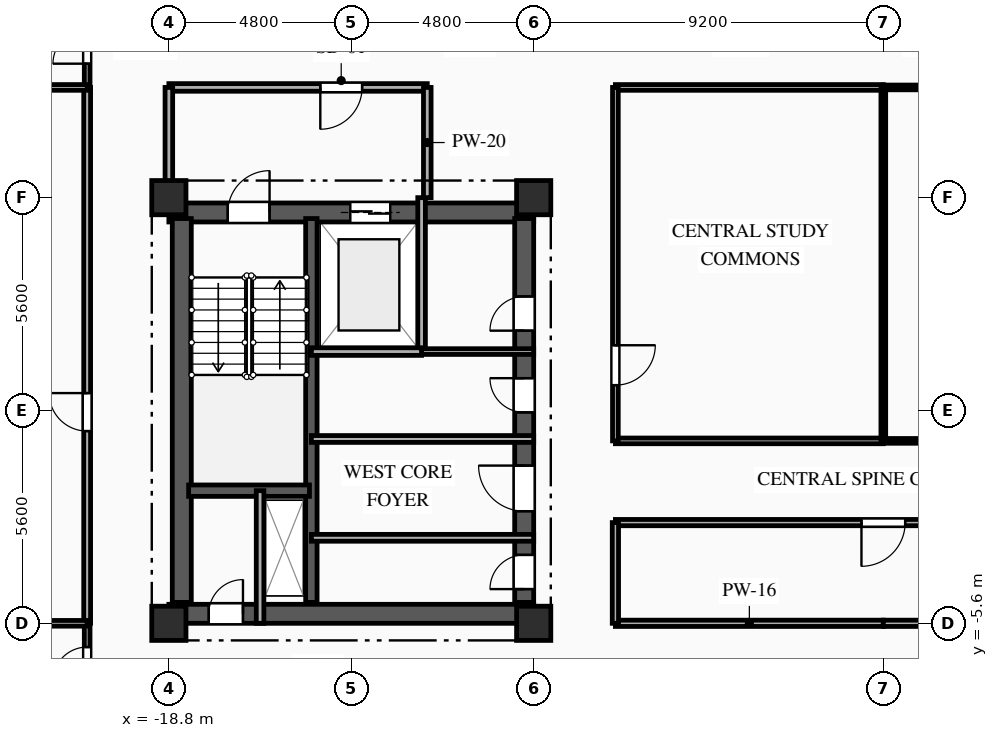
"""IFC4 building model, lengths in metres.
Left out: names, types, materials, properties, quantities, classifications, styles, units other than length and angle.
Written with IfcOpenShell. Run it as: python <this file> out.ifc"""

import sys

from ifc_helpers import new_model, si_unit, direction, frame, frame_2d, origin, origin_2d, place, context, subcontext, project, spatial, rectangle, extrude, element, fill, save


model = new_model("IFC4")
c1 = context("Model", 3, precision=1e-05, world=origin(), true_north=direction((0.0, 1.0)))
c2 = subcontext(c1, "Body", "Model", "MODEL_VIEW")
j1 = project(units=[si_unit("LENGTHUNIT", "METRE"), si_unit("PLANEANGLEUNIT", "RADIAN")], contexts=[c1])
p1 = place(None, origin())
s1 = spatial("IfcSite", under=j1, at=p1, CompositionType="ELEMENT")
p2 = place(p1, origin())
s2 = spatial("IfcBuilding", under=s1, at=p2, CompositionType="ELEMENT")
p3 = place(p2, frame((0.0, 0.0, 141.05)))
s3 = spatial("IfcBuildingStorey", under=s2, at=p3, CompositionType="ELEMENT", Elevation=141.05)
for number, where, z_axis, x_axis in (
    (1, (-18.8, -5.6, 0.0), (0.0, 0.0, 1.0), (1.0, 0.0, 0.0)),
    (2, (-18.8, 5.6, 0.0), (0.0, 0.0, 1.0), (1.0, 0.0, 0.0)),
    (3, (-9.2, -5.6, 0.0), (0.0, 0.0, 1.0), (1.0, 0.0, 0.0)),
    (4, (-9.2, 5.6, 0.0), (0.0, 0.0, 1.0), (1.0, 0.0, 0.0)),
):
    element("IfcColumn", number, at=place(p3, frame(where, z_axis=z_axis, x_axis=x_axis)), inside=s3, PredefinedType="COLUMN", context=c2, shape_type="SweptSolid", body=[
        extrude(rectangle(XDim=0.9, YDim=0.9, at=origin_2d()), origin(), (0.0, 0.0, 1.0), 3.35),
    ])
p4 = place(p3, frame((-18.8, 5.21, 0.0), z_axis=(0.0, 0.0, 1.0), x_axis=(1.0, 0.0, 0.0)))
e5 = element("IfcWall", 5, at=p4, inside=s3, PredefinedType="SHEAR", context=c2, shape_type="SweptSolid", body=[
    extrude(rectangle(XDim=9.6, YDim=0.5, at=frame_2d((4.8, 0.0))), origin(), (0.0, 0.0, 1.0), 3.04),
])
p5 = place(p4, frame((1.55, 0.0, 0.0)))
e6 = element("IfcOpeningElement", 6, at=p5, cuts=e5, PredefinedType="OPENING", context=c2, shape_type="SweptSolid", body=[
    extrude(rectangle(XDim=1.1, YDim=2.15, at=frame_2d((0.55, 1.075))), frame((0.0, 0.26, 0.0), z_axis=(0.0, -1.0, 0.0), x_axis=(1.0, 0.0, 0.0)), (0.0, 0.0, 1.0), 0.52),
])
p6 = place(p4, frame((4.775, 0.0, 0.0)))
e7 = element("IfcOpeningElement", 7, at=p6, cuts=e5, PredefinedType="OPENING", context=c2, shape_type="SweptSolid", body=[
    extrude(rectangle(XDim=1.05, YDim=2.1, at=frame_2d((0.525, 1.05))), frame((0.0, 0.26, 0.0), z_axis=(0.0, -1.0, 0.0), x_axis=(1.0, 0.0, 0.0)), (0.0, 0.0, 1.0), 0.52),
])
p7 = place(p3, frame((-18.8, -5.35, 0.0), z_axis=(0.0, 0.0, 1.0), x_axis=(1.0, 0.0, 0.0)))
e8 = element("IfcWall", 8, at=p7, inside=s3, PredefinedType="SHEAR", context=c2, shape_type="SweptSolid", body=[
    extrude(rectangle(XDim=9.6, YDim=0.5, at=frame_2d((4.8, 0.0))), origin(), (0.0, 0.0, 1.0), 3.04),
])
p8 = place(p7, frame((1.05, 0.0, 0.0)))
e9 = element("IfcOpeningElement", 9, at=p8, cuts=e8, PredefinedType="OPENING", context=c2, shape_type="SweptSolid", body=[
    extrude(rectangle(XDim=0.9, YDim=2.1, at=frame_2d((0.45, 1.05))), frame((0.0, 0.26, 0.0), z_axis=(0.0, -1.0, 0.0), x_axis=(1.0, 0.0, 0.0)), (0.0, 0.0, 1.0), 0.52),
])
p9 = place(p3, frame((-18.46, -5.05, 0.0), z_axis=(0.0, 0.0, 1.0), x_axis=(0.0, 1.0, 0.0)))
e10 = element("IfcWall", 10, at=p9, inside=s3, PredefinedType="SHEAR", context=c2, shape_type="SweptSolid", body=[
    extrude(rectangle(XDim=10.1, YDim=0.5, at=frame_2d((5.05, 0.0))), origin(), (0.0, 0.0, 1.0), 3.04),
])
p10 = place(p3, frame((-9.45, -5.05, 0.0), z_axis=(0.0, 0.0, 1.0), x_axis=(0.0, 1.0, 0.0)))
e11 = element("IfcWall", 11, at=p10, inside=s3, PredefinedType="SHEAR", context=c2, shape_type="SweptSolid", body=[
    extrude(rectangle(XDim=10.1, YDim=0.5, at=frame_2d((5.05, 0.0))), origin(), (0.0, 0.0, 1.0), 3.04),
])
p11 = place(p10, frame((7.15, 0.0, 0.0)))
e12 = element("IfcOpeningElement", 12, at=p11, cuts=e11, PredefinedType="OPENING", context=c2, shape_type="SweptSolid", body=[
    extrude(rectangle(XDim=0.9, YDim=2.1, at=frame_2d((0.45, 1.05))), frame((0.0, 0.26, 0.0), z_axis=(0.0, -1.0, 0.0), x_axis=(1.0, 0.0, 0.0)), (0.0, 0.0, 1.0), 0.52),
])
p12 = place(p10, frame((2.4, 0.0, 0.0)))
e13 = element("IfcOpeningElement", 13, at=p12, cuts=e11, PredefinedType="OPENING", context=c2, shape_type="SweptSolid", body=[
    extrude(rectangle(XDim=1.2, YDim=2.15, at=frame_2d((0.6, 1.075))), frame((0.0, 0.26, 0.0), z_axis=(0.0, -1.0, 0.0), x_axis=(1.0, 0.0, 0.0)), (0.0, 0.0, 1.0), 0.52),
])
p13 = place(p10, frame((0.35, 0.0, 0.0)))
e14 = element("IfcOpeningElement", 14, at=p13, cuts=e11, PredefinedType="OPENING", context=c2, shape_type="SweptSolid", body=[
    extrude(rectangle(XDim=0.9, YDim=2.1, at=frame_2d((0.45, 1.05))), frame((0.0, 0.26, 0.0), z_axis=(0.0, -1.0, 0.0), x_axis=(1.0, 0.0, 0.0)), (0.0, 0.0, 1.0), 0.52),
])
p14 = place(p10, frame((5.0, 0.0, 0.0)))
e15 = element("IfcOpeningElement", 15, at=p14, cuts=e11, PredefinedType="OPENING", context=c2, shape_type="SweptSolid", body=[
    extrude(rectangle(XDim=0.9, YDim=2.1, at=frame_2d((0.45, 1.05))), frame((0.0, 0.26, 0.0), z_axis=(0.0, -1.0, 0.0), x_axis=(1.0, 0.0, 0.0)), (0.0, 0.0, 1.0), 0.52),
])
p15 = place(p3, frame((-15.05, -5.05, 0.0), z_axis=(0.0, 0.0, 1.0), x_axis=(0.0, 1.0, 0.0)))
e16 = element("IfcWall", 16, at=p15, inside=s3, PredefinedType="SHEAR", context=c2, shape_type="SweptSolid", body=[
    extrude(rectangle(XDim=10.1, YDim=0.3, at=frame_2d((5.05, 0.0))), origin(), (0.0, 0.0, 1.0), 3.04),
])
p16 = place(p3, frame((-18.28, -2.11, 0.0), z_axis=(0.0, 0.0, 1.0), x_axis=(1.0, 0.0, 0.0)))
e17 = element("IfcWall", 17, at=p16, inside=s3, PredefinedType="SHEAR", context=c2, shape_type="SweptSolid", body=[
    extrude(rectangle(XDim=3.18, YDim=0.3, at=frame_2d((1.59, 0.0))), origin(), (0.0, 0.0, 1.0), 3.04),
])
p17 = place(p3, frame((-16.4, -5.6, 0.0), z_axis=(0.0, 0.0, 1.0), x_axis=(0.0, 1.0, 0.0)))
e18 = element("IfcWall", 18, at=p17, inside=s3, PredefinedType="PARTITIONING", context=c2, shape_type="SweptSolid", body=[
    extrude(rectangle(XDim=3.49, YDim=0.2, at=frame_2d((1.745, 0.0))), origin(), (0.0, 0.0, 1.0), 3.04),
])
p18 = place(p3, frame((-12.15, 1.55, 0.0), z_axis=(0.0, 0.0, 1.0), x_axis=(0.0, 1.0, 0.0)))
e19 = element("IfcWall", 19, at=p18, inside=s3, PredefinedType="PARTITIONING", context=c2, shape_type="SweptSolid", body=[
    extrude(rectangle(XDim=4.05, YDim=0.2, at=frame_2d((2.025, 0.0))), origin(), (0.0, 0.0, 1.0), 3.04),
])
p19 = place(p3, frame((-12.0, 8.5, 0.0), z_axis=(0.0, 0.0, 1.0), x_axis=(-1.0, 0.0, 0.0)))
e20 = element("IfcWall", 20, at=p19, inside=s3, PredefinedType="PARTITIONING", context=c2, shape_type="SweptSolid", body=[
    extrude(rectangle(XDim=6.8, YDim=0.2, at=frame_2d((3.4, 0.0))), origin(), (0.0, 0.0, 1.0), 3.04),
])
p20 = place(p19, frame((1.715, 0.0, 0.0)))
e21 = element("IfcOpeningElement", 21, at=p20, cuts=e20, PredefinedType="OPENING", context=c2, shape_type="SweptSolid", body=[
    extrude(rectangle(XDim=1.1, YDim=2.15, at=frame_2d((0.55, 1.075))), frame((0.0, 0.11, 0.0), z_axis=(0.0, -1.0, 0.0), x_axis=(1.0, 0.0, 0.0)), (0.0, 0.0, 1.0), 0.22),
])
p21 = place(p3, frame((-18.8, 8.5, 0.0), z_axis=(0.0, 0.0, 1.0), x_axis=(0.0, -1.0, 0.0)))
e22 = element("IfcWall", 22, at=p21, inside=s3, PredefinedType="PARTITIONING", context=c2, shape_type="SweptSolid", body=[
    extrude(rectangle(XDim=2.9, YDim=0.2, at=frame_2d((1.45, 0.0))), origin(), (0.0, 0.0, 1.0), 2.525),
])
p22 = place(p3, frame((-12.0, 5.6, 0.0), z_axis=(0.0, 0.0, 1.0), x_axis=(0.0, 1.0, 0.0)))
e23 = element("IfcWall", 23, at=p22, inside=s3, PredefinedType="PARTITIONING", context=c2, shape_type="SweptSolid", body=[
    extrude(rectangle(XDim=2.9, YDim=0.2, at=frame_2d((1.45, 0.0))), origin(), (0.0, 0.0, 1.0), 3.04),
])
p23 = place(p3, frame((-12.15, 1.55, 0.0), z_axis=(0.0, 0.0, 1.0), x_axis=(1.0, 0.0, 0.0)))
e24 = element("IfcWall", 24, at=p23, inside=s3, PredefinedType="PARTITIONING", context=c2, shape_type="SweptSolid", body=[
    extrude(rectangle(XDim=2.95, YDim=0.15, at=frame_2d((1.475, 0.0))), origin(), (0.0, 0.0, 1.0), 3.04),
])
p24 = place(p3, frame((-15.05, -3.35, 0.0), z_axis=(0.0, 0.0, 1.0), x_axis=(1.0, 0.0, 0.0)))
e25 = element("IfcWall", 25, at=p24, inside=s3, PredefinedType="PARTITIONING", context=c2, shape_type="SweptSolid", body=[
    extrude(rectangle(XDim=5.85, YDim=0.18, at=frame_2d((2.925, 0.0))), origin(), (0.0, 0.0, 1.0), 2.755),
])
p25 = place(p3, frame((-9.2, -0.75, 0.0), z_axis=(0.0, 0.0, 1.0), x_axis=(-1.0, 0.0, 0.0)))
e26 = element("IfcWall", 26, at=p25, inside=s3, PredefinedType="PARTITIONING", context=c2, shape_type="SweptSolid", body=[
    extrude(rectangle(XDim=5.85, YDim=0.18, at=frame_2d((2.925, 0.0))), origin(), (0.0, 0.0, 1.0), 3.04),
])
p26 = place(p3, frame((-20.95, 8.5, 0.0), z_axis=(0.0, 0.0, 1.0), x_axis=(0.0, 1.0, 0.0)))
e27 = element("IfcWall", 27, at=p26, inside=s3, PredefinedType="PARTITIONING", context=c2, shape_type="SweptSolid", body=[
    extrude(rectangle(XDim=2.15, YDim=0.15, at=frame_2d((1.075, 0.0))), origin(), (0.0, 0.0, 1.0), 3.04),
])
p27 = place(p26, frame((0.625, 0.0, 0.0)))
e28 = element("IfcOpeningElement", 28, at=p27, cuts=e27, PredefinedType="OPENING", context=c2, shape_type="SweptSolid", body=[
    extrude(rectangle(XDim=0.9, YDim=2.1, at=frame_2d((0.45, 1.05))), frame((0.0, 0.085, 0.0), z_axis=(0.0, -1.0, 0.0), x_axis=(1.0, 0.0, 0.0)), (0.0, 0.0, 1.0), 0.17),
])
p28 = place(p3, frame((0.0, 8.5, 0.0), z_axis=(0.0, 0.0, 1.0), x_axis=(-1.0, 0.0, 0.0)))
e29 = element("IfcWall", 29, at=p28, inside=s3, PredefinedType="PARTITIONING", context=c2, shape_type="SweptSolid", body=[
    extrude(rectangle(XDim=7.05, YDim=0.15, at=frame_2d((3.525, 0.0))), origin(), (0.0, 0.0, 1.0), 3.04),
])
p29 = place(p3, frame((7.05, 8.5, 0.0), z_axis=(0.0, 0.0, 1.0), x_axis=(-1.0, 0.0, 0.0)))
e30 = element("IfcWall", 30, at=p29, inside=s3, PredefinedType="PARTITIONING", context=c2, shape_type="SweptSolid", body=[
    extrude(rectangle(XDim=7.05, YDim=0.125, at=frame_2d((3.525, 0.0))), origin(), (0.0, 0.0, 1.0), 3.04),
])
p30 = place(p3, frame((-20.95, -7.75, 0.0), z_axis=(0.0, 0.0, 1.0), x_axis=(0.0, 1.0, 0.0)))
e31 = element("IfcWall", 31, at=p30, inside=s3, PredefinedType="PARTITIONING", context=c2, shape_type="SweptSolid", body=[
    extrude(rectangle(XDim=2.15, YDim=0.15, at=frame_2d((1.075, 0.0))), origin(), (0.0, 0.0, 1.0), 3.04),
])
p31 = place(p30, frame((0.625, 0.0, 0.0)))
e32 = element("IfcOpeningElement", 32, at=p31, cuts=e31, PredefinedType="OPENING", context=c2, shape_type="SweptSolid", body=[
    extrude(rectangle(XDim=0.9, YDim=2.1, at=frame_2d((0.45, 1.05))), frame((0.0, 0.085, 0.0), z_axis=(0.0, -1.0, 0.0), x_axis=(1.0, 0.0, 0.0)), (0.0, 0.0, 1.0), 0.17),
])
for number, where, z_axis, x_axis in (
    (33, (-7.05, -5.6, 0.0), (0.0, 0.0, 1.0), (1.0, 0.0, 0.0)),
    (34, (0.0, -5.6, 0.0), (0.0, 0.0, 1.0), (1.0, 0.0, 0.0)),
):
    element("IfcWall", number, at=place(p3, frame(where, z_axis=z_axis, x_axis=x_axis)), inside=s3, PredefinedType="PARTITIONING", context=c2, shape_type="SweptSolid", body=[
        extrude(rectangle(XDim=7.05, YDim=0.165, at=frame_2d((3.525, 0.0))), origin(), (0.0, 0.0, 1.0), 2.525),
    ])
p32 = place(p3, frame((-20.95, -5.6, 0.0), z_axis=(0.0, 0.0, 1.0), x_axis=(0.0, 1.0, 0.0)))
e35 = element("IfcWall", 35, at=p32, inside=s3, PredefinedType="PARTITIONING", context=c2, shape_type="SweptSolid", body=[
    extrude(rectangle(XDim=14.1, YDim=0.18, at=frame_2d((7.05, 0.0))), origin(), (0.0, 0.0, 1.0), 3.04),
])
p33 = place(p32, frame((5.058, 0.0, 0.0)))
e36 = element("IfcOpeningElement", 36, at=p33, cuts=e35, PredefinedType="OPENING", context=c2, shape_type="SweptSolid", body=[
    extrude(rectangle(XDim=1.0, YDim=2.15, at=frame_2d((0.5, 1.075))), frame((0.0, 0.1, 0.0), z_axis=(0.0, -1.0, 0.0), x_axis=(1.0, 0.0, 0.0)), (0.0, 0.0, 1.0), 0.2),
])
p34 = place(p3, frame((-7.05, -0.8, 0.0), z_axis=(0.0, 0.0, 1.0), x_axis=(1.0, 0.0, 0.0)))
e37 = element("IfcWall", 37, at=p34, inside=s3, PredefinedType="PARTITIONING", context=c2, shape_type="SweptSolid", body=[
    extrude(rectangle(XDim=7.05, YDim=0.15, at=frame_2d((3.525, 0.0))), origin(), (0.0, 0.0, 1.0), 3.04),
])
p35 = place(p3, frame((0.0, -0.8, 0.0), z_axis=(0.0, 0.0, 1.0), x_axis=(1.0, 0.0, 0.0)))
e38 = element("IfcWall", 38, at=p35, inside=s3, PredefinedType="PARTITIONING", context=c2, shape_type="SweptSolid", body=[
    extrude(rectangle(XDim=7.05, YDim=0.125, at=frame_2d((3.525, 0.0))), origin(), (0.0, 0.0, 1.0), 3.04),
])
p36 = place(p3, frame((7.05, -2.95, 0.0), z_axis=(0.0, 0.0, 1.0), x_axis=(-1.0, 0.0, 0.0)))
e39 = element("IfcWall", 39, at=p36, inside=s3, PredefinedType="PARTITIONING", context=c2, shape_type="SweptSolid", body=[
    extrude(rectangle(XDim=14.1, YDim=0.165, at=frame_2d((7.05, 0.0))), origin(), (0.0, 0.0, 1.0), 3.04),
])
p37 = place(p36, frame((6.475, 0.0, 0.0)))
e40 = element("IfcOpeningElement", 40, at=p37, cuts=e39, PredefinedType="OPENING", context=c2, shape_type="SweptSolid", body=[
    extrude(rectangle(XDim=1.15, YDim=2.15, at=frame_2d((0.575, 1.075))), frame((0.0, 0.093, 0.0), z_axis=(0.0, -1.0, 0.0), x_axis=(1.0, 0.0, 0.0)), (0.0, 0.0, 1.0), 0.185),
])
p38 = place(p3, frame((-7.05, 8.5, 0.0), z_axis=(0.0, 0.0, 1.0), x_axis=(0.0, -1.0, 0.0)))
e41 = element("IfcWall", 41, at=p38, inside=s3, PredefinedType="PARTITIONING", context=c2, shape_type="SweptSolid", body=[
    extrude(rectangle(XDim=9.3, YDim=0.15, at=frame_2d((4.65, 0.0))), origin(), (0.0, 0.0, 1.0), 3.04),
])
p39 = place(p38, frame((6.784, 0.0, 0.0)))
e42 = element("IfcOpeningElement", 42, at=p39, cuts=e41, PredefinedType="OPENING", context=c2, shape_type="SweptSolid", body=[
    extrude(rectangle(XDim=1.05, YDim=2.15, at=frame_2d((0.525, 1.075))), frame((0.0, 0.085, 0.0), z_axis=(0.0, -1.0, 0.0), x_axis=(1.0, 0.0, 0.0)), (0.0, 0.0, 1.0), 0.17),
])
p40 = place(p3, frame((-7.05, -2.95, 0.0), z_axis=(0.0, 0.0, 1.0), x_axis=(0.0, -1.0, 0.0)))
e43 = element("IfcWall", 43, at=p40, inside=s3, PredefinedType="PARTITIONING", context=c2, shape_type="SweptSolid", body=[
    extrude(rectangle(XDim=2.65, YDim=0.165, at=frame_2d((1.325, 0.0))), origin(), (0.0, 0.0, 1.0), 3.04),
])
p41 = place(p3, frame((-23.6, 8.5, 0.0), z_axis=(0.0, 0.0, 1.0), x_axis=(1.0, 0.0, 0.0)))
e44 = element("IfcWall", 44, at=p41, inside=s3, PredefinedType="PARTITIONING", context=c2, shape_type="SweptSolid", body=[
    extrude(rectangle(XDim=2.65, YDim=0.15, at=frame_2d((1.325, 0.0))), origin(), (0.0, 0.0, 1.0), 3.04),
])
p42 = place(p41, frame((0.635, 0.0, 0.0)))
e45 = element("IfcOpeningElement", 45, at=p42, cuts=e44, PredefinedType="OPENING", context=c2, shape_type="SweptSolid", body=[
    extrude(rectangle(XDim=1.05, YDim=2.15, at=frame_2d((0.525, 1.075))), frame((0.0, 0.085, 0.0), z_axis=(0.0, -1.0, 0.0), x_axis=(1.0, 0.0, 0.0)), (0.0, 0.0, 1.0), 0.17),
])
p43 = place(p3, frame((-20.95, -5.6, 0.0), z_axis=(0.0, 0.0, 1.0), x_axis=(-1.0, 0.0, 0.0)))
e46 = element("IfcWall", 46, at=p43, inside=s3, PredefinedType="PARTITIONING", context=c2, shape_type="SweptSolid", body=[
    extrude(rectangle(XDim=2.65, YDim=0.15, at=frame_2d((1.325, 0.0))), origin(), (0.0, 0.0, 1.0), 3.04),
])
p44 = place(p43, frame((0.965, 0.0, 0.0)))
e47 = element("IfcOpeningElement", 47, at=p44, cuts=e46, PredefinedType="OPENING", context=c2, shape_type="SweptSolid", body=[
    extrude(rectangle(XDim=1.05, YDim=2.15, at=frame_2d((0.525, 1.075))), frame((0.0, 0.085, 0.0), z_axis=(0.0, -1.0, 0.0), x_axis=(1.0, 0.0, 0.0)), (0.0, 0.0, 1.0), 0.17),
])
p45 = place(p3, frame((0.0, 8.5, 0.0), z_axis=(0.0, 0.0, 1.0), x_axis=(0.0, -1.0, 0.0)))
e48 = element("IfcWall", 48, at=p45, inside=s3, PredefinedType="PARTITIONING", context=c2, shape_type="SweptSolid", body=[
    extrude(rectangle(XDim=9.3, YDim=0.125, at=frame_2d((4.65, 0.0))), origin(), (0.0, 0.0, 1.0), 3.04),
])
p46 = place(p3, frame((-15.05, 1.55, 0.0), z_axis=(0.0, 0.0, 1.0), x_axis=(1.0, 0.0, 0.0)))
e49 = element("IfcWall", 49, at=p46, inside=s3, PredefinedType="PARTITIONING", context=c2, shape_type="SweptSolid", body=[
    extrude(rectangle(XDim=2.9, YDim=0.2, at=frame_2d((1.45, 0.0))), origin(), (0.0, 0.0, 1.0), 3.04),
])
p47 = place(p5, origin())
e50 = element("IfcDoor", 50, at=p47, inside=s3, OperationType="SINGLE_SWING_RIGHT", PredefinedType="DOOR", context=c2, shape_type="SweptSolid", body=[
    extrude(rectangle(XDim=1.1, YDim=2.15, at=frame_2d((0.55, 1.075))), frame((0.0, 0.025, 0.0), z_axis=(0.0, -1.0, 0.0), x_axis=(1.0, 0.0, 0.0)), (0.0, 0.0, 1.0), 0.05),
])
fill(e6, e50)
p48 = place(p6, origin())
e51 = element("IfcDoor", 51, at=p48, inside=s3, OperationType="DOUBLE_DOOR_SLIDING", PredefinedType="DOOR", context=c2, shape_type="SweptSolid", body=[
    extrude(rectangle(XDim=1.05, YDim=2.1, at=frame_2d((0.525, 1.05))), frame((0.0, 0.025, 0.0), z_axis=(0.0, -1.0, 0.0), x_axis=(1.0, 0.0, 0.0)), (0.0, 0.0, 1.0), 0.05),
])
fill(e7, e51)
p49 = place(p8, origin())
e52 = element("IfcDoor", 52, at=p49, inside=s3, OperationType="SINGLE_SWING_RIGHT", PredefinedType="DOOR", context=c2, shape_type="SweptSolid", body=[
    extrude(rectangle(XDim=0.9, YDim=2.1, at=frame_2d((0.45, 1.05))), frame((0.0, 0.025, 0.0), z_axis=(0.0, -1.0, 0.0), x_axis=(1.0, 0.0, 0.0)), (0.0, 0.0, 1.0), 0.05),
])
fill(e9, e52)
p50 = place(p20, origin())
e53 = element("IfcDoor", 53, at=p50, inside=s3, OperationType="SINGLE_SWING_RIGHT", PredefinedType="DOOR", context=c2, shape_type="SweptSolid", body=[
    extrude(rectangle(XDim=1.1, YDim=2.15, at=frame_2d((0.55, 1.075))), frame((0.0, 0.025, 0.0), z_axis=(0.0, -1.0, 0.0), x_axis=(1.0, 0.0, 0.0)), (0.0, 0.0, 1.0), 0.05),
])
fill(e21, e53)
p51 = place(p11, origin())
e54 = element("IfcDoor", 54, at=p51, inside=s3, OperationType="SINGLE_SWING_LEFT", PredefinedType="DOOR", context=c2, shape_type="SweptSolid", body=[
    extrude(rectangle(XDim=0.9, YDim=2.1, at=frame_2d((0.45, 1.05))), frame((0.0, 0.025, 0.0), z_axis=(0.0, -1.0, 0.0), x_axis=(1.0, 0.0, 0.0)), (0.0, 0.0, 1.0), 0.05),
])
fill(e12, e54)
p52 = place(p12, origin())
e55 = element("IfcDoor", 55, at=p52, inside=s3, OperationType="SINGLE_SWING_RIGHT", PredefinedType="DOOR", context=c2, shape_type="SweptSolid", body=[
    extrude(rectangle(XDim=1.2, YDim=2.15, at=frame_2d((0.6, 1.075))), frame((0.0, 0.025, 0.0), z_axis=(0.0, -1.0, 0.0), x_axis=(1.0, 0.0, 0.0)), (0.0, 0.0, 1.0), 0.05),
])
fill(e13, e55)
p53 = place(p13, origin())
e56 = element("IfcDoor", 56, at=p53, inside=s3, OperationType="SINGLE_SWING_LEFT", PredefinedType="DOOR", context=c2, shape_type="SweptSolid", body=[
    extrude(rectangle(XDim=0.9, YDim=2.1, at=frame_2d((0.45, 1.05))), frame((0.0, 0.025, 0.0), z_axis=(0.0, -1.0, 0.0), x_axis=(1.0, 0.0, 0.0)), (0.0, 0.0, 1.0), 0.05),
])
fill(e14, e56)
p54 = place(p14, origin())
e57 = element("IfcDoor", 57, at=p54, inside=s3, OperationType="SINGLE_SWING_RIGHT", PredefinedType="DOOR", context=c2, shape_type="SweptSolid", body=[
    extrude(rectangle(XDim=0.9, YDim=2.1, at=frame_2d((0.45, 1.05))), frame((0.0, 0.025, 0.0), z_axis=(0.0, -1.0, 0.0), x_axis=(1.0, 0.0, 0.0)), (0.0, 0.0, 1.0), 0.05),
])
fill(e15, e57)
p55 = place(p27, origin())
e58 = element("IfcDoor", 58, at=p55, inside=s3, OperationType="SINGLE_SWING_LEFT", PredefinedType="DOOR", context=c2, shape_type="SweptSolid", body=[
    extrude(rectangle(XDim=0.9, YDim=2.1, at=frame_2d((0.45, 1.05))), frame((0.0, 0.025, 0.0), z_axis=(0.0, -1.0, 0.0), x_axis=(1.0, 0.0, 0.0)), (0.0, 0.0, 1.0), 0.05),
])
fill(e28, e58)
p56 = place(p31, origin())
e59 = element("IfcDoor", 59, at=p56, inside=s3, OperationType="SINGLE_SWING_LEFT", PredefinedType="DOOR", context=c2, shape_type="SweptSolid", body=[
    extrude(rectangle(XDim=0.9, YDim=2.1, at=frame_2d((0.45, 1.05))), frame((0.0, 0.025, 0.0), z_axis=(0.0, -1.0, 0.0), x_axis=(1.0, 0.0, 0.0)), (0.0, 0.0, 1.0), 0.05),
])
fill(e32, e59)
p57 = place(p33, origin())
e60 = element("IfcDoor", 60, at=p57, inside=s3, OperationType="SINGLE_SWING_RIGHT", PredefinedType="DOOR", context=c2, shape_type="SweptSolid", body=[
    extrude(rectangle(XDim=1.0, YDim=2.15, at=frame_2d((0.5, 1.075))), frame((0.0, 0.025, 0.0), z_axis=(0.0, -1.0, 0.0), x_axis=(1.0, 0.0, 0.0)), (0.0, 0.0, 1.0), 0.05),
])
fill(e36, e60)
p58 = place(p37, origin())
e61 = element("IfcDoor", 61, at=p58, inside=s3, OperationType="SINGLE_SWING_RIGHT", PredefinedType="DOOR", context=c2, shape_type="SweptSolid", body=[
    extrude(rectangle(XDim=1.15, YDim=2.15, at=frame_2d((0.575, 1.075))), frame((0.0, 0.025, 0.0), z_axis=(0.0, -1.0, 0.0), x_axis=(1.0, 0.0, 0.0)), (0.0, 0.0, 1.0), 0.05),
])
fill(e40, e61)
p59 = place(p39, origin())
e62 = element("IfcDoor", 62, at=p59, inside=s3, OperationType="SINGLE_SWING_LEFT", PredefinedType="DOOR", context=c2, shape_type="SweptSolid", body=[
    extrude(rectangle(XDim=1.05, YDim=2.15, at=frame_2d((0.525, 1.075))), frame((0.0, 0.025, 0.0), z_axis=(0.0, -1.0, 0.0), x_axis=(1.0, 0.0, 0.0)), (0.0, 0.0, 1.0), 0.05),
])
fill(e42, e62)
save(model, sys.argv[1])
